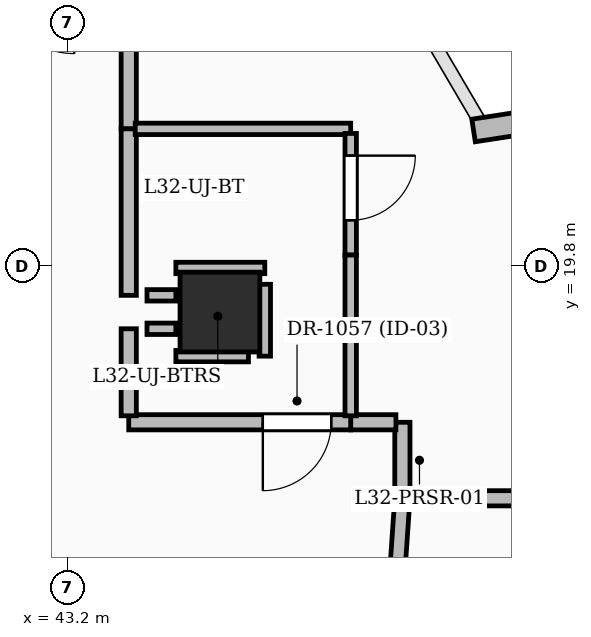
"""IFC4 building model, lengths in metres.
Left out: names, types, materials, properties, quantities, classifications, styles, units other than length and angle.
Written with IfcOpenShell. Run it as: python <this file> out.ifc"""

import sys

from ifc_helpers import new_model, si_unit, direction, frame, frame_2d, origin, origin_2d, place, context, subcontext, project, spatial, rectangle, extrude, element, fill, save


model = new_model("IFC4")
c1 = context("Model", 3, precision=1e-05, world=origin(), true_north=direction((0.0, 1.0)))
c2 = subcontext(c1, "Body", "Model", "MODEL_VIEW")
j1 = project(units=[si_unit("LENGTHUNIT", "METRE"), si_unit("PLANEANGLEUNIT", "RADIAN")], contexts=[c1])
p1 = place(None, origin())
s1 = spatial("IfcSite", under=j1, at=p1, CompositionType="ELEMENT")
p2 = place(p1, origin())
s2 = spatial("IfcBuilding", under=s1, at=p2, CompositionType="ELEMENT")
p3 = place(p2, frame((0.0, 0.0, 128.4)))
s3 = spatial("IfcBuildingStorey", under=s2, at=p3, CompositionType="ELEMENT", Elevation=128.4)
p4 = place(p3, frame((45.2, 19.2, 0.0), z_axis=(0.0, 0.0, 1.0), x_axis=(1.0, 0.0, 0.0)))
e1 = element("IfcColumn", 1, at=p4, inside=s3, PredefinedType="COLUMN", context=c2, shape_type="SweptSolid", body=[
    extrude(rectangle(XDim=1.05, YDim=1.05, at=origin_2d()), origin(), (0.0, 0.0, 1.0), 3.6),
])
p5 = place(p3, frame((48.537, 21.589, 0.0), z_axis=(0.0, 0.0, 1.0), x_axis=(0.988351014823, 0.152191561848, 0.0)))
e2 = element("IfcWall", 2, at=p5, inside=s3, PredefinedType="SOLIDWALL", context=c2, shape_type="SweptSolid", body=[
    extrude(rectangle(XDim=2.594, YDim=0.3, at=frame_2d((1.297, 0.0))), origin(), (0.0, 0.0, 1.0), 2.575),
])
p6 = place(p3, frame((47.425, 14.2, 0.0), z_axis=(0.0, 0.0, 1.0), x_axis=(0.068484119878, 0.997652206595, 0.0)))
e3 = element("IfcWall", 3, at=p6, inside=s3, PredefinedType="PARTITIONING", context=c2, shape_type="SweptSolid", body=[
    extrude(rectangle(XDim=2.556, YDim=0.2, at=frame_2d((1.278, 0.0))), origin(), (0.0, 0.0, 1.0), 1.12),
])
p7 = place(p3, frame((44.0, 21.61, 0.0), z_axis=(0.0, 0.0, 1.0), x_axis=(0.0, 1.0, 0.0)))
e4 = element("IfcWall", 4, at=p7, inside=s3, PredefinedType="PARTITIONING", context=c2, shape_type="SweptSolid", body=[
    extrude(rectangle(XDim=1.99, YDim=0.2, at=frame_2d((0.995, 0.0))), origin(), (0.0, 0.0, 1.0), 2.436),
])
p8 = place(p3, frame((47.6, 16.75, 0.0), z_axis=(0.0, 0.0, 1.0), x_axis=(0.0, 1.0, 0.0)))
e5 = element("IfcWall", 5, at=p8, inside=s3, PredefinedType="PARTITIONING", context=c2, shape_type="SweptSolid", body=[
    extrude(rectangle(XDim=1.0, YDim=0.2, at=frame_2d((0.5, 0.0))), origin(), (0.0, 0.0, 1.0), 3.35),
])
p9 = place(p3, frame((47.515, 17.75, 0.0), z_axis=(0.0, 0.0, 1.0), x_axis=(-1.0, 0.0, 0.0)))
e6 = element("IfcWall", 6, at=p9, inside=s3, PredefinedType="PARTITIONING", context=c2, shape_type="SweptSolid", body=[
    extrude(rectangle(XDim=0.595, YDim=0.2, at=frame_2d((0.297, 0.0))), origin(), (0.0, 0.0, 1.0), 3.35),
])
p10 = place(p3, frame((46.92, 17.75, 0.0), z_axis=(0.0, 0.0, 1.0), x_axis=(-1.0, 0.0, 0.0)))
e7 = element("IfcWall", 7, at=p10, inside=s3, PredefinedType="PARTITIONING", context=c2, shape_type="SweptSolid", body=[
    extrude(rectangle(XDim=2.92, YDim=0.2, at=frame_2d((1.46, 0.0))), origin(), (0.0, 0.0, 1.0), 2.436),
])
p11 = place(p10, frame((0.256, 0.0, 0.0)))
e8 = element("IfcOpeningElement", 8, at=p11, cuts=e7, PredefinedType="OPENING", context=c2, shape_type="SweptSolid", body=[
    extrude(rectangle(XDim=0.9, YDim=2.1, at=frame_2d((0.45, 1.05))), frame((0.0, 0.11, 0.0), z_axis=(0.0, -1.0, 0.0), x_axis=(1.0, 0.0, 0.0)), (0.0, 0.0, 1.0), 0.22),
])
p12 = place(p3, frame((44.0, 17.835, 0.0), z_axis=(0.0, 0.0, 1.0), x_axis=(0.0, 1.0, 0.0)))
e9 = element("IfcWall", 9, at=p12, inside=s3, PredefinedType="PARTITIONING", context=c2, shape_type="SweptSolid", body=[
    extrude(rectangle(XDim=1.145, YDim=0.2, at=frame_2d((0.573, 0.0))), origin(), (0.0, 0.0, 1.0), 3.35),
])
p13 = place(p3, frame((44.0, 19.42, 0.0), z_axis=(0.0, 0.0, 1.0), x_axis=(0.0, 1.0, 0.0)))
e10 = element("IfcWall", 10, at=p13, inside=s3, PredefinedType="PARTITIONING", context=c2, shape_type="SweptSolid", body=[
    extrude(rectangle(XDim=2.19, YDim=0.2, at=frame_2d((1.095, 0.0))), origin(), (0.0, 0.0, 1.0), 3.35),
])
p14 = place(p3, frame((50.01, 16.75, 0.0), z_axis=(0.0, 0.0, 1.0), x_axis=(-1.0, 0.0, 0.0)))
e11 = element("IfcWall", 11, at=p14, inside=s3, PredefinedType="PARTITIONING", context=c2, shape_type="SweptSolid", body=[
    extrude(rectangle(XDim=2.325, YDim=0.2, at=frame_2d((1.163, 0.0))), origin(), (0.0, 0.0, 1.0), 1.12),
])
p15 = place(p3, frame((44.085, 21.61, 0.0), z_axis=(0.0, 0.0, 1.0), x_axis=(1.0, 0.0, 0.0)))
e12 = element("IfcWall", 12, at=p15, inside=s3, PredefinedType="PARTITIONING", context=c2, shape_type="SweptSolid", body=[
    extrude(rectangle(XDim=2.835, YDim=0.15, at=frame_2d((1.417, 0.0))), origin(), (0.0, 0.0, 1.0), 1.12),
])
p16 = place(p3, frame((46.92, 21.55, 0.0), z_axis=(0.0, 0.0, 1.0), x_axis=(0.0, -1.0, 0.0)))
e13 = element("IfcWall", 13, at=p16, inside=s3, PredefinedType="PARTITIONING", context=c2, shape_type="SweptSolid", body=[
    extrude(rectangle(XDim=1.6, YDim=0.15, at=frame_2d((0.8, 0.0))), origin(), (0.0, 0.0, 1.0), 2.911),
])
p17 = place(p16, frame((0.292, 0.0, 0.0)))
e14 = element("IfcOpeningElement", 14, at=p17, cuts=e13, PredefinedType="OPENING", context=c2, shape_type="SweptSolid", body=[
    extrude(rectangle(XDim=0.85, YDim=2.1, at=frame_2d((0.425, 1.05))), frame((0.0, 0.085, 0.0), z_axis=(0.0, -1.0, 0.0), x_axis=(1.0, 0.0, 0.0)), (0.0, 0.0, 1.0), 0.17),
])
p18 = place(p3, frame((46.92, 19.95, 0.0), z_axis=(0.0, 0.0, 1.0), x_axis=(0.0, -1.0, 0.0)))
e15 = element("IfcWall", 15, at=p18, inside=s3, PredefinedType="PARTITIONING", context=c2, shape_type="SweptSolid", body=[
    extrude(rectangle(XDim=2.115, YDim=0.15, at=frame_2d((1.058, 0.0))), origin(), (0.0, 0.0, 1.0), 2.911),
])
p19 = place(p3, frame((44.24, 19.42, 0.0), z_axis=(0.0, 0.0, 1.0), x_axis=(1.0, 0.0, 0.0)))
e16 = element("IfcWall", 16, at=p19, inside=s3, PredefinedType="PARTITIONING", context=c2, shape_type="SweptSolid", body=[
    extrude(rectangle(XDim=0.38, YDim=0.15, at=frame_2d((0.19, 0.0))), origin(), (0.0, 0.0, 1.0), 3.35),
])
p20 = place(p3, frame((44.62, 19.78, 0.0), z_axis=(0.0, 0.0, 1.0), x_axis=(1.0, 0.0, 0.0)))
e17 = element("IfcWall", 17, at=p20, inside=s3, PredefinedType="PARTITIONING", context=c2, shape_type="SweptSolid", body=[
    extrude(rectangle(XDim=1.17, YDim=0.15, at=frame_2d((0.585, 0.0))), origin(), (0.0, 0.0, 1.0), 1.12),
])
p21 = place(p3, frame((45.79, 19.565, 0.0), z_axis=(0.0, 0.0, 1.0), x_axis=(0.0, -1.0, 0.0)))
e18 = element("IfcWall", 18, at=p21, inside=s3, PredefinedType="PARTITIONING", context=c2, shape_type="SweptSolid", body=[
    extrude(rectangle(XDim=0.945, YDim=0.15, at=frame_2d((0.472, 0.0))), origin(), (0.0, 0.0, 1.0), 3.35),
])
p22 = place(p3, frame((45.575, 18.62, 0.0), z_axis=(0.0, 0.0, 1.0), x_axis=(-1.0, 0.0, 0.0)))
e19 = element("IfcWall", 19, at=p22, inside=s3, PredefinedType="PARTITIONING", context=c2, shape_type="SweptSolid", body=[
    extrude(rectangle(XDim=0.955, YDim=0.15, at=frame_2d((0.478, 0.0))), origin(), (0.0, 0.0, 1.0), 2.436),
])
p23 = place(p3, frame((44.62, 18.98, 0.0), z_axis=(0.0, 0.0, 1.0), x_axis=(-1.0, 0.0, 0.0)))
e20 = element("IfcWall", 20, at=p23, inside=s3, PredefinedType="PARTITIONING", context=c2, shape_type="SweptSolid", body=[
    extrude(rectangle(XDim=0.38, YDim=0.15, at=frame_2d((0.19, 0.0))), origin(), (0.0, 0.0, 1.0), 3.35),
])
p24 = place(p17, origin())
e21 = element("IfcDoor", 21, at=p24, inside=s3, OperationType="SINGLE_SWING_LEFT", PredefinedType="DOOR", context=c2, shape_type="SweptSolid", body=[
    extrude(rectangle(XDim=0.85, YDim=2.1, at=frame_2d((0.425, 1.05))), frame((0.0, 0.025, 0.0), z_axis=(0.0, -1.0, 0.0), x_axis=(1.0, 0.0, 0.0)), (0.0, 0.0, 1.0), 0.05),
])
fill(e14, e21)
p25 = place(p11, origin())
e22 = element("IfcDoor", 22, at=p25, inside=s3, OperationType="SINGLE_SWING_RIGHT", PredefinedType="DOOR", context=c2, shape_type="SweptSolid", body=[
    extrude(rectangle(XDim=0.9, YDim=2.1, at=frame_2d((0.45, 1.05))), frame((0.0, 0.025, 0.0), z_axis=(0.0, -1.0, 0.0), x_axis=(1.0, 0.0, 0.0)), (0.0, 0.0, 1.0), 0.05),
])
fill(e8, e22)
save(model, sys.argv[1])
